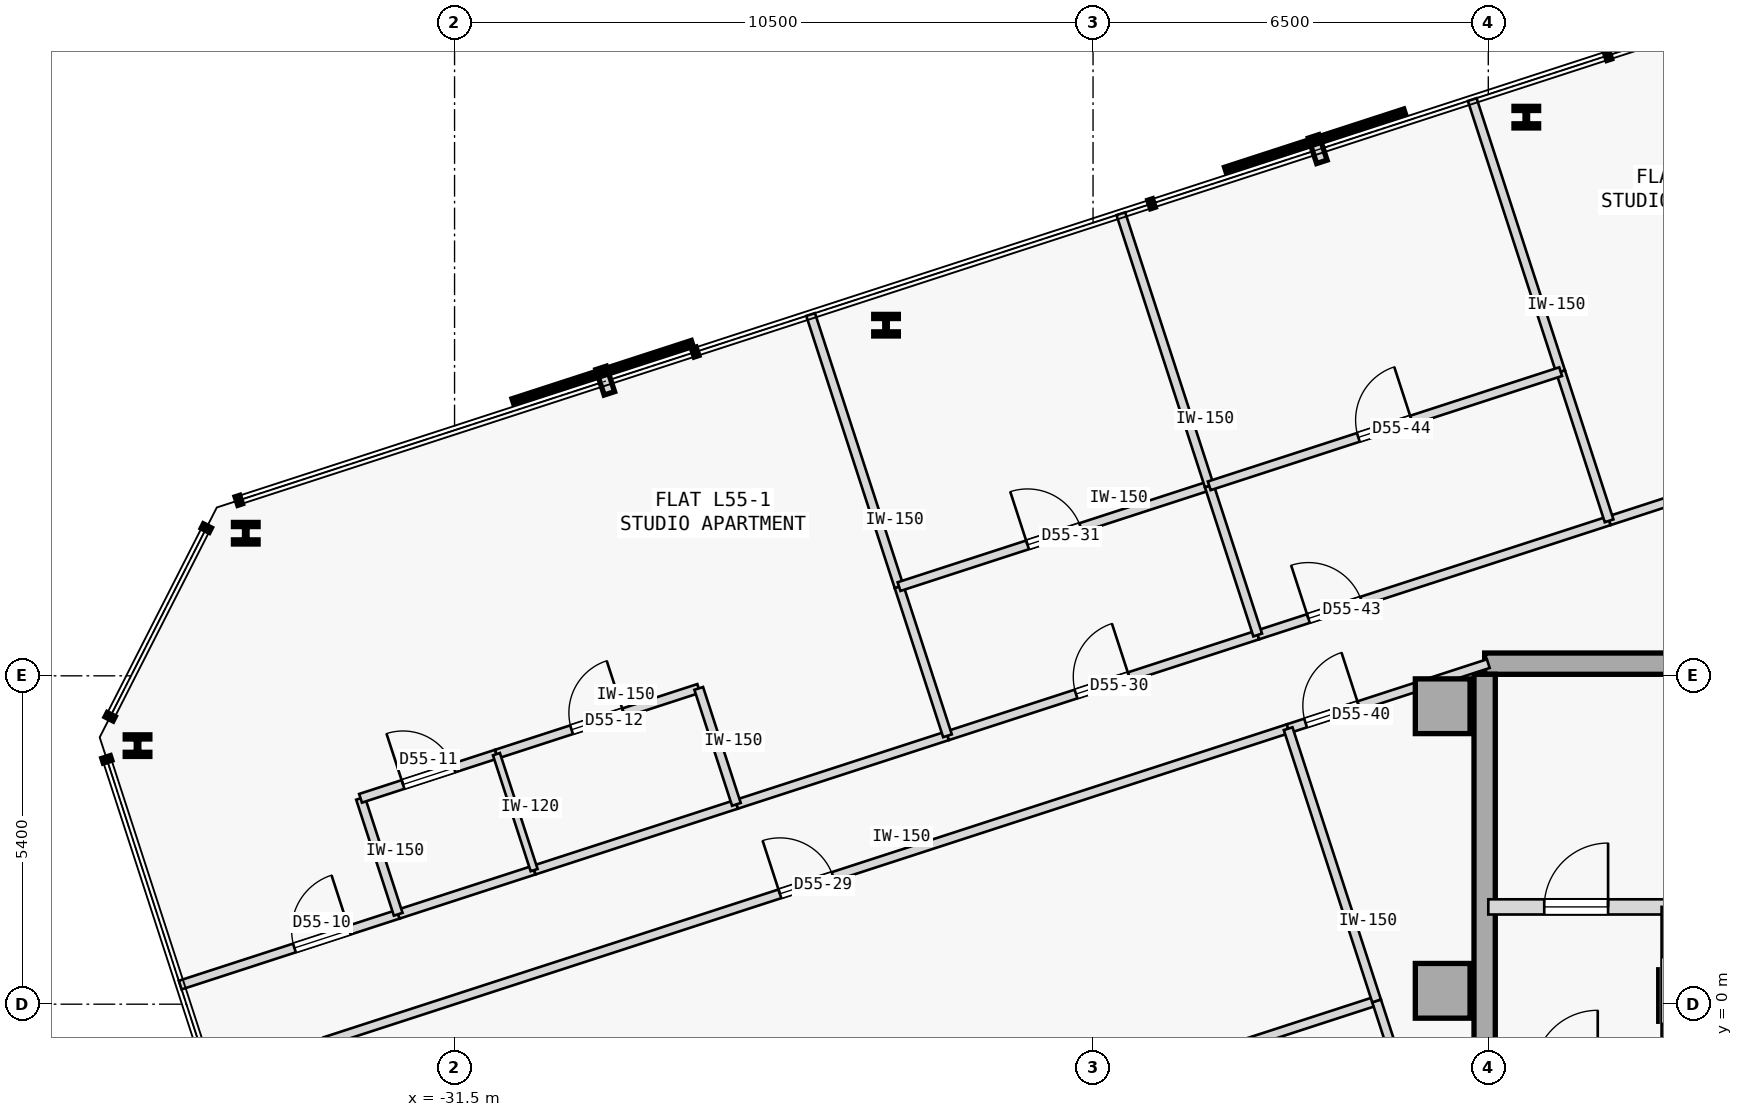
"""IFC4 building model, lengths in metres.
Left out: names, types, materials, properties, quantities, classifications, styles, units other than length and angle.
Written with IfcOpenShell. Run it as: python <this file> out.ifc"""

import sys

from ifc_helpers import new_model, si_unit, direction, frame, frame_2d, origin, origin_2d, place, context, subcontext, project, spatial, rectangle, i_section, extrude, element, fill, save


model = new_model("IFC4")
c1 = context("Model", 3, precision=1e-05, world=origin(), true_north=direction((0.0, 1.0)))
c2 = subcontext(c1, "Body", "Model", "MODEL_VIEW")
j1 = project(units=[si_unit("LENGTHUNIT", "METRE"), si_unit("PLANEANGLEUNIT", "RADIAN")], contexts=[c1])
p1 = place(None, origin())
s1 = spatial("IfcSite", under=j1, at=p1, CompositionType="ELEMENT")
p2 = place(p1, origin())
s2 = spatial("IfcBuilding", under=s1, at=p2, CompositionType="ELEMENT")
p3 = place(p2, frame((0.0, 0.0, 210.9)))
s3 = spatial("IfcBuildingStorey", under=s2, at=p3, CompositionType="ELEMENT", Elevation=210.9)
for number, where, z_axis, x_axis in (
    (1, (-15.25, 4.9, 0.0), (0.0, 0.0, 1.0), (1.0, 0.0, 0.0)),
    (2, (-15.25, 0.22, 0.0), (0.0, 0.0, 1.0), (1.0, 0.0, 0.0)),
):
    element("IfcColumn", number, at=place(p3, frame(where, z_axis=z_axis, x_axis=x_axis)), inside=s3, PredefinedType="COLUMN", context=c2, shape_type="SweptSolid", body=[
        extrude(rectangle(XDim=0.9, YDim=0.9, at=origin_2d()), origin(), (0.0, 0.0, 1.0), 3.35),
    ])
p4 = place(p3, frame((-14.56, 5.6, 0.0), z_axis=(0.0, 0.0, 1.0), x_axis=(1.0, 0.0, 0.0)))
e3 = element("IfcWall", 3, at=p4, inside=s3, PredefinedType="SHEAR", context=c2, shape_type="SweptSolid", body=[
    extrude(rectangle(XDim=11.41, YDim=0.35, at=frame_2d((5.705, 0.0))), origin(), (0.0, 0.0, 1.0), 3.125),
])
p5 = place(p3, frame((-14.56, -5.425, 0.0), z_axis=(0.0, 0.0, 1.0), x_axis=(0.0, 1.0, 0.0)))
e4 = element("IfcWall", 4, at=p5, inside=s3, PredefinedType="SHEAR", context=c2, shape_type="SweptSolid", body=[
    extrude(rectangle(XDim=10.85, YDim=0.35, at=frame_2d((5.425, 0.0))), origin(), (0.0, 0.0, 1.0), 3.125),
])
for number, where, z_axis, x_axis in (
    (5, (-13.875, 14.587, 0.0), (0.0, 0.0, 1.0), (1.0, 0.0, 0.0)),
    (6, (-24.404, 11.166, 0.0), (0.0, 0.0, 1.0), (1.0, 0.0, 0.0)),
    (7, (-34.934, 7.745, 0.0), (0.0, 0.0, 1.0), (1.0, 0.0, 0.0)),
    (8, (-36.713, 4.252, 0.0), (0.0, 0.0, 1.0), (1.0, 0.0, 0.0)),
):
    element("IfcColumn", number, at=place(p3, frame(where, z_axis=z_axis, x_axis=x_axis)), inside=s3, PredefinedType="COLUMN", context=c2, shape_type="SweptSolid", body=[
        extrude(i_section(OverallWidth=0.405, OverallDepth=0.355, WebThickness=0.042, FlangeThickness=0.068, FilletRadius=0.015, at=origin_2d()), origin(), (0.0, 0.0, 1.0), 3.35),
    ])
p6 = place(p3, frame((-14.5, 1.6, 0.0), z_axis=(0.0, 0.0, 1.0), x_axis=(1.0, 0.0, 0.0)))
e9 = element("IfcWall", 9, at=p6, inside=s3, PredefinedType="STANDARD", context=c2, shape_type="SweptSolid", body=[
    extrude(rectangle(XDim=3.6, YDim=0.25, at=frame_2d((1.8, 0.0))), origin(), (0.0, 0.0, 1.0), 3.125),
])
p7 = place(p6, frame((0.92, 0.0, 0.0)))
e10 = element("IfcOpeningElement", 10, at=p7, cuts=e9, PredefinedType="OPENING", context=c2, shape_type="SweptSolid", body=[
    extrude(rectangle(XDim=1.05, YDim=2.15, at=frame_2d((0.525, 1.075))), frame((0.0, 0.135, 0.0), z_axis=(0.0, -1.0, 0.0), x_axis=(1.0, 0.0, 0.0)), (0.0, 0.0, 1.0), 0.27),
])
p8 = place(p3, frame((-11.55, -1.15, 0.0), z_axis=(0.0, 0.0, 1.0), x_axis=(0.0, 1.0, 0.0)))
e11 = element("IfcWall", 11, at=p8, inside=s3, PredefinedType="STANDARD", context=c2, shape_type="SweptSolid", body=[
    extrude(rectangle(XDim=2.75, YDim=0.2, at=frame_2d((1.375, 0.0))), origin(), (0.0, 0.0, 1.0), 3.125),
])
p9 = place(p8, frame((0.825, 0.0, 0.0)))
e12 = element("IfcOpeningElement", 12, at=p9, cuts=e11, PredefinedType="OPENING", context=c2, shape_type="SweptSolid", body=[
    extrude(rectangle(XDim=1.1, YDim=2.15, at=frame_2d((0.55, 1.075))), frame((0.0, 0.11, 0.0), z_axis=(0.0, -1.0, 0.0), x_axis=(1.0, 0.0, 0.0)), (0.0, 0.0, 1.0), 0.22),
])
p10 = place(p3, frame((-36.012, 0.314, 0.0), z_axis=(0.0, 0.0, 1.0), x_axis=(0.951071182868, 0.308971851659, 0.0)))
e13 = element("IfcWall", 13, at=p10, inside=s3, PredefinedType="PARTITIONING", context=c2, shape_type="SweptSolid", body=[
    extrude(rectangle(XDim=3.77, YDim=0.15, at=frame_2d((1.885, 0.0))), origin(), (0.0, 0.0, 1.0), 3.125),
])
p11 = place(p10, frame((1.976, 0.0, 0.0)))
e14 = element("IfcOpeningElement", 14, at=p11, cuts=e13, PredefinedType="OPENING", context=c2, shape_type="SweptSolid", body=[
    extrude(rectangle(XDim=0.95, YDim=2.15, at=frame_2d((0.475, 1.075))), frame((0.0, 0.085, 0.0), z_axis=(0.0, -1.0, 0.0), x_axis=(1.0, 0.0, 0.0)), (0.0, 0.0, 1.0), 0.17),
])
p12 = place(p3, frame((-26.865, 3.286, 0.0), z_axis=(0.0, 0.0, 1.0), x_axis=(0.951057168147, 0.309014988174, 0.0)))
e15 = element("IfcWall", 15, at=p12, inside=s3, PredefinedType="PARTITIONING", context=c2, shape_type="SweptSolid", body=[
    extrude(rectangle(XDim=3.65, YDim=0.15, at=frame_2d((1.825, 0.0))), origin(), (0.0, 0.0, 1.0), 3.125),
])
p13 = place(p3, frame((-32.427, 1.479, 0.0), z_axis=(0.0, 0.0, 1.0), x_axis=(0.951045519245, 0.309050837767, 0.0)))
e16 = element("IfcWall", 16, at=p13, inside=s3, PredefinedType="PARTITIONING", context=c2, shape_type="SweptSolid", body=[
    extrude(rectangle(XDim=2.35, YDim=0.15, at=frame_2d((1.175, 0.0))), origin(), (0.0, 0.0, 1.0), 3.125),
])
p14 = place(p3, frame((-30.192, 2.205, 0.0), z_axis=(0.0, 0.0, 1.0), x_axis=(0.951063814176, 0.308994532905, 0.0)))
e17 = element("IfcWall", 17, at=p14, inside=s3, PredefinedType="PARTITIONING", context=c2, shape_type="SweptSolid", body=[
    extrude(rectangle(XDim=3.498, YDim=0.15, at=frame_2d((1.749, 0.0))), origin(), (0.0, 0.0, 1.0), 3.125),
])
p15 = place(p3, frame((-12.513, 7.949, 0.0), z_axis=(0.0, 0.0, 1.0), x_axis=(0.951050780541, 0.309034646652, 0.0)))
e18 = element("IfcWall", 18, at=p15, inside=s3, PredefinedType="PARTITIONING", context=c2, shape_type="SweptSolid", body=[
    extrude(rectangle(XDim=3.65, YDim=0.15, at=frame_2d((1.825, 0.0))), origin(), (0.0, 0.0, 1.0), 3.125),
])
p16 = place(p3, frame((-33.633, -0.616, 0.0), z_axis=(0.0, 0.0, 1.0), x_axis=(0.951058192995, 0.309011833974, 0.0)))
e19 = element("IfcWall", 19, at=p16, inside=s3, PredefinedType="PARTITIONING", context=c2, shape_type="SweptSolid", body=[
    extrude(rectangle(XDim=16.657, YDim=0.15, at=frame_2d((8.329, 0.0))), origin(), (0.0, 0.0, 1.0), 3.125),
])
p17 = place(p16, frame((7.868, 0.0, 0.0)))
e20 = element("IfcOpeningElement", 20, at=p17, cuts=e19, PredefinedType="OPENING", context=c2, shape_type="SweptSolid", body=[
    extrude(rectangle(XDim=0.92, YDim=2.15, at=frame_2d((0.46, 1.075))), frame((0.0, 0.085, 0.0), z_axis=(0.0, -1.0, 0.0), x_axis=(1.0, 0.0, 0.0)), (0.0, 0.0, 1.0), 0.17),
])
p18 = place(p3, frame((-23.394, 4.414, 0.0), z_axis=(0.0, 0.0, 1.0), x_axis=(0.951050121956, 0.309036673434, 0.0)))
e21 = element("IfcWall", 21, at=p18, inside=s3, PredefinedType="PARTITIONING", context=c2, shape_type="SweptSolid", body=[
    extrude(rectangle(XDim=5.364, YDim=0.15, at=frame_2d((2.682, 0.0))), origin(), (0.0, 0.0, 1.0), 3.125),
])
p19 = place(p18, frame((2.222, 0.0, 0.0)))
e22 = element("IfcOpeningElement", 22, at=p19, cuts=e21, PredefinedType="OPENING", context=c2, shape_type="SweptSolid", body=[
    extrude(rectangle(XDim=0.92, YDim=2.15, at=frame_2d((0.46, 1.075))), frame((0.0, 0.085, 0.0), z_axis=(0.0, -1.0, 0.0), x_axis=(1.0, 0.0, 0.0)), (0.0, 0.0, 1.0), 0.17),
])
p20 = place(p3, frame((-17.792, 4.531, 0.0), z_axis=(0.0, 0.0, 1.0), x_axis=(0.951047546178, 0.309044600193, 0.0)))
e23 = element("IfcWall", 23, at=p20, inside=s3, PredefinedType="PARTITIONING", context=c2, shape_type="SweptSolid", body=[
    extrude(rectangle(XDim=3.461, YDim=0.15, at=frame_2d((1.73, 0.0))), origin(), (0.0, 0.0, 1.0), 3.125),
])
p21 = place(p20, frame((0.302, 0.0, 0.0)))
e24 = element("IfcOpeningElement", 24, at=p21, cuts=e23, PredefinedType="OPENING", context=c2, shape_type="SweptSolid", body=[
    extrude(rectangle(XDim=0.92, YDim=2.15, at=frame_2d((0.46, 1.075))), frame((0.0, 0.085, 0.0), z_axis=(0.0, -1.0, 0.0), x_axis=(1.0, 0.0, 0.0)), (0.0, 0.0, 1.0), 0.17),
])
p22 = place(p3, frame((-18.292, 6.072, 0.0), z_axis=(0.0, 0.0, 1.0), x_axis=(0.951062707515, 0.30899793911, 0.0)))
e25 = element("IfcWall", 25, at=p22, inside=s3, PredefinedType="PARTITIONING", context=c2, shape_type="SweptSolid", body=[
    extrude(rectangle(XDim=6.076, YDim=0.15, at=frame_2d((3.038, 0.0))), origin(), (0.0, 0.0, 1.0), 3.125),
])
p23 = place(p22, frame((0.877, 0.0, 0.0)))
e26 = element("IfcOpeningElement", 26, at=p23, cuts=e25, PredefinedType="OPENING", context=c2, shape_type="SweptSolid", body=[
    extrude(rectangle(XDim=0.92, YDim=2.15, at=frame_2d((0.46, 1.075))), frame((0.0, 0.085, 0.0), z_axis=(0.0, -1.0, 0.0), x_axis=(1.0, 0.0, 0.0)), (0.0, 0.0, 1.0), 0.17),
])
p24 = place(p3, frame((-32.427, 1.479, 0.0), z_axis=(0.0, 0.0, 1.0), x_axis=(-0.309022749039, 0.951054646472, 0.0)))
e27 = element("IfcWall", 27, at=p24, inside=s3, PredefinedType="PARTITIONING", context=c2, shape_type="SweptSolid", body=[
    extrude(rectangle(XDim=2.005, YDim=0.15, at=frame_2d((1.002, 0.0))), origin(), (0.0, 0.0, 1.0), 3.125),
])
p25 = place(p3, frame((-33.046, 3.386, 0.0), z_axis=(0.0, 0.0, 1.0), x_axis=(0.951045519245, 0.309050837767, 0.0)))
e28 = element("IfcWall", 28, at=p25, inside=s3, PredefinedType="PARTITIONING", context=c2, shape_type="SweptSolid", body=[
    extrude(rectangle(XDim=2.35, YDim=0.15, at=frame_2d((1.175, 0.0))), origin(), (0.0, 0.0, 1.0), 3.125),
])
p26 = place(p25, frame((0.735, 0.0, 0.0)))
e29 = element("IfcOpeningElement", 29, at=p26, cuts=e28, PredefinedType="OPENING", context=c2, shape_type="SweptSolid", body=[
    extrude(rectangle(XDim=0.88, YDim=2.15, at=frame_2d((0.44, 1.075))), frame((0.0, 0.085, 0.0), z_axis=(0.0, -1.0, 0.0), x_axis=(1.0, 0.0, 0.0)), (0.0, 0.0, 1.0), 0.17),
])
p27 = place(p3, frame((-30.811, 4.112, 0.0), z_axis=(0.0, 0.0, 1.0), x_axis=(0.951063814176, 0.308994532905, 0.0)))
e30 = element("IfcWall", 30, at=p27, inside=s3, PredefinedType="PARTITIONING", context=c2, shape_type="SweptSolid", body=[
    extrude(rectangle(XDim=3.498, YDim=0.15, at=frame_2d((1.749, 0.0))), origin(), (0.0, 0.0, 1.0), 3.125),
])
p28 = place(p27, frame((1.299, 0.0, 0.0)))
e31 = element("IfcOpeningElement", 31, at=p28, cuts=e30, PredefinedType="OPENING", context=c2, shape_type="SweptSolid", body=[
    extrude(rectangle(XDim=0.9, YDim=2.15, at=frame_2d((0.45, 1.075))), frame((0.0, 0.085, 0.0), z_axis=(0.0, -1.0, 0.0), x_axis=(1.0, 0.0, 0.0)), (0.0, 0.0, 1.0), 0.17),
])
p29 = place(p3, frame((-26.865, 3.286, 0.0), z_axis=(0.0, 0.0, 1.0), x_axis=(-0.309022749039, 0.951054646472, 0.0)))
e32 = element("IfcWall", 32, at=p29, inside=s3, PredefinedType="PARTITIONING", context=c2, shape_type="SweptSolid", body=[
    extrude(rectangle(XDim=2.005, YDim=0.15, at=frame_2d((1.002, 0.0))), origin(), (0.0, 0.0, 1.0), 3.125),
])
p30 = place(p3, frame((-23.394, 4.414, 0.0), z_axis=(0.0, 0.0, 1.0), x_axis=(-0.308976906612, 0.951069540665, 0.0)))
e33 = element("IfcWall", 33, at=p30, inside=s3, PredefinedType="PARTITIONING", context=c2, shape_type="SweptSolid", body=[
    extrude(rectangle(XDim=2.579, YDim=0.15, at=frame_2d((1.29, 0.0))), origin(), (0.0, 0.0, 1.0), 3.125),
])
p31 = place(p3, frame((-24.19, 6.867, 0.0), z_axis=(0.0, 0.0, 1.0), x_axis=(-0.309057912466, 0.951043220228, 0.0)))
e34 = element("IfcWall", 34, at=p31, inside=s3, PredefinedType="PARTITIONING", context=c2, shape_type="SweptSolid", body=[
    extrude(rectangle(XDim=4.705, YDim=0.15, at=frame_2d((2.353, 0.0))), origin(), (0.0, 0.0, 1.0), 3.125),
])
p32 = place(p3, frame((-30.192, 2.205, 0.0), z_axis=(0.0, 0.0, 1.0), x_axis=(-0.309022749039, 0.951054646472, 0.0)))
e35 = element("IfcWall", 35, at=p32, inside=s3, PredefinedType="PARTITIONING", context=c2, shape_type="SweptSolid", body=[
    extrude(rectangle(XDim=2.005, YDim=0.12, at=frame_2d((1.002, 0.0))), origin(), (0.0, 0.0, 1.0), 3.125),
])
p33 = place(p3, frame((-12.513, 7.949, 0.0), z_axis=(0.0, 0.0, 1.0), x_axis=(-0.309062527822, 0.951041720376, 0.0)))
e36 = element("IfcWall", 36, at=p33, inside=s3, PredefinedType="PARTITIONING", context=c2, shape_type="SweptSolid", body=[
    extrude(rectangle(XDim=2.579, YDim=0.15, at=frame_2d((1.29, 0.0))), origin(), (0.0, 0.0, 1.0), 3.125),
])
p34 = place(p3, frame((-13.311, 10.402, 0.0), z_axis=(0.0, 0.0, 1.0), x_axis=(-0.309010977541, 0.951058471262, 0.0)))
e37 = element("IfcWall", 37, at=p34, inside=s3, PredefinedType="PARTITIONING", context=c2, shape_type="SweptSolid", body=[
    extrude(rectangle(XDim=4.705, YDim=0.15, at=frame_2d((2.353, 0.0))), origin(), (0.0, 0.0, 1.0), 3.125),
])
p35 = place(p3, frame((-32.179, -5.093, 0.0), z_axis=(0.0, 0.0, 1.0), x_axis=(0.951053885426, 0.309025091239, 0.0)))
e38 = element("IfcWall", 38, at=p35, inside=s3, PredefinedType="PARTITIONING", context=c2, shape_type="SweptSolid", body=[
    extrude(rectangle(XDim=16.657, YDim=0.15, at=frame_2d((8.329, 0.0))), origin(), (0.0, 0.0, 1.0), 3.125),
])
p36 = place(p3, frame((-15.685, -1.952, 0.0), z_axis=(0.0, 0.0, 1.0), x_axis=(-0.308929092959, 0.951085072706, 0.0)))
e39 = element("IfcWall", 39, at=p36, inside=s3, PredefinedType="PARTITIONING", context=c2, shape_type="SweptSolid", body=[
    extrude(rectangle(XDim=2.11, YDim=0.15, at=frame_2d((1.055, 0.0))), origin(), (0.0, 0.0, 1.0), 3.125),
])
p37 = place(p3, frame((-16.337, 0.054, 0.0), z_axis=(0.0, 0.0, 1.0), x_axis=(-0.309029776355, 0.951052363083, 0.0)))
e40 = element("IfcWall", 40, at=p37, inside=s3, PredefinedType="PARTITIONING", context=c2, shape_type="SweptSolid", body=[
    extrude(rectangle(XDim=4.707, YDim=0.15, at=frame_2d((2.354, 0.0))), origin(), (0.0, 0.0, 1.0), 3.125),
])
p38 = place(p3, frame((-24.19, 6.867, 0.0), z_axis=(0.0, 0.0, 1.0), x_axis=(0.951059152206, 0.309008881758, 0.0)))
e41 = element("IfcWall", 41, at=p38, inside=s3, PredefinedType="PARTITIONING", context=c2, shape_type="SweptSolid", body=[
    extrude(rectangle(XDim=5.364, YDim=0.15, at=frame_2d((2.682, 0.0))), origin(), (0.0, 0.0, 1.0), 3.125),
])
p39 = place(p38, frame((2.222, 0.0, 0.0)))
e42 = element("IfcOpeningElement", 42, at=p39, cuts=e41, PredefinedType="OPENING", context=c2, shape_type="SweptSolid", body=[
    extrude(rectangle(XDim=0.92, YDim=2.15, at=frame_2d((0.46, 1.075))), frame((0.0, 0.085, 0.0), z_axis=(0.0, -1.0, 0.0), x_axis=(1.0, 0.0, 0.0)), (0.0, 0.0, 1.0), 0.17),
])
p40 = place(p3, frame((-18.292, 6.072, 0.0), z_axis=(0.0, 0.0, 1.0), x_axis=(-0.309090353524, 0.951032677335, 0.0)))
e43 = element("IfcWall", 43, at=p40, inside=s3, PredefinedType="PARTITIONING", context=c2, shape_type="SweptSolid", body=[
    extrude(rectangle(XDim=2.579, YDim=0.15, at=frame_2d((1.29, 0.0))), origin(), (0.0, 0.0, 1.0), 3.125),
])
p41 = place(p3, frame((-19.089, 8.524, 0.0), z_axis=(0.0, 0.0, 1.0), x_axis=(-0.308995728133, 0.951063425853, 0.0)))
e44 = element("IfcWall", 44, at=p41, inside=s3, PredefinedType="PARTITIONING", context=c2, shape_type="SweptSolid", body=[
    extrude(rectangle(XDim=4.705, YDim=0.15, at=frame_2d((2.353, 0.0))), origin(), (0.0, 0.0, 1.0), 3.125),
])
p42 = place(p3, frame((-19.089, 8.524, 0.0), z_axis=(0.0, 0.0, 1.0), x_axis=(0.951050898488, 0.309034283674, 0.0)))
e45 = element("IfcWall", 45, at=p42, inside=s3, PredefinedType="PARTITIONING", context=c2, shape_type="SweptSolid", body=[
    extrude(rectangle(XDim=6.076, YDim=0.15, at=frame_2d((3.038, 0.0))), origin(), (0.0, 0.0, 1.0), 3.125),
])
p43 = place(p42, frame((2.578, 0.0, 0.0)))
e46 = element("IfcOpeningElement", 46, at=p43, cuts=e45, PredefinedType="OPENING", context=c2, shape_type="SweptSolid", body=[
    extrude(rectangle(XDim=0.92, YDim=2.15, at=frame_2d((0.46, 1.075))), frame((0.0, 0.085, 0.0), z_axis=(0.0, -1.0, 0.0), x_axis=(1.0, 0.0, 0.0)), (0.0, 0.0, 1.0), 0.17),
])
p44 = place(p7, origin())
e47 = element("IfcDoor", 47, at=p44, inside=s3, OperationType="SINGLE_SWING_RIGHT", PredefinedType="DOOR", context=c2, shape_type="SweptSolid", body=[
    extrude(rectangle(XDim=1.05, YDim=2.15, at=frame_2d((0.525, 1.075))), frame((0.0, 0.025, 0.0), z_axis=(0.0, -1.0, 0.0), x_axis=(1.0, 0.0, 0.0)), (0.0, 0.0, 1.0), 0.05),
])
fill(e10, e47)
p45 = place(p11, origin())
e48 = element("IfcDoor", 48, at=p45, inside=s3, OperationType="SINGLE_SWING_RIGHT", PredefinedType="DOOR", context=c2, shape_type="SweptSolid", body=[
    extrude(rectangle(XDim=0.95, YDim=2.15, at=frame_2d((0.475, 1.075))), frame((0.0, 0.025, 0.0), z_axis=(0.0, -1.0, 0.0), x_axis=(1.0, 0.0, 0.0)), (0.0, 0.0, 1.0), 0.05),
])
fill(e14, e48)
p46 = place(p26, origin())
e49 = element("IfcDoor", 49, at=p46, inside=s3, OperationType="SINGLE_SWING_LEFT", PredefinedType="DOOR", context=c2, shape_type="SweptSolid", body=[
    extrude(rectangle(XDim=0.88, YDim=2.15, at=frame_2d((0.44, 1.075))), frame((0.0, 0.025, 0.0), z_axis=(0.0, -1.0, 0.0), x_axis=(1.0, 0.0, 0.0)), (0.0, 0.0, 1.0), 0.05),
])
fill(e29, e49)
p47 = place(p28, origin())
e50 = element("IfcDoor", 50, at=p47, inside=s3, OperationType="SINGLE_SWING_RIGHT", PredefinedType="DOOR", context=c2, shape_type="SweptSolid", body=[
    extrude(rectangle(XDim=0.9, YDim=2.15, at=frame_2d((0.45, 1.075))), frame((0.0, 0.025, 0.0), z_axis=(0.0, -1.0, 0.0), x_axis=(1.0, 0.0, 0.0)), (0.0, 0.0, 1.0), 0.05),
])
fill(e31, e50)
p48 = place(p17, origin())
e51 = element("IfcDoor", 51, at=p48, inside=s3, OperationType="SINGLE_SWING_LEFT", PredefinedType="DOOR", context=c2, shape_type="SweptSolid", body=[
    extrude(rectangle(XDim=0.92, YDim=2.15, at=frame_2d((0.46, 1.075))), frame((0.0, 0.025, 0.0), z_axis=(0.0, -1.0, 0.0), x_axis=(1.0, 0.0, 0.0)), (0.0, 0.0, 1.0), 0.05),
])
fill(e20, e51)
p49 = place(p19, origin())
e52 = element("IfcDoor", 52, at=p49, inside=s3, OperationType="SINGLE_SWING_RIGHT", PredefinedType="DOOR", context=c2, shape_type="SweptSolid", body=[
    extrude(rectangle(XDim=0.92, YDim=2.15, at=frame_2d((0.46, 1.075))), frame((0.0, 0.025, 0.0), z_axis=(0.0, -1.0, 0.0), x_axis=(1.0, 0.0, 0.0)), (0.0, 0.0, 1.0), 0.05),
])
fill(e22, e52)
p50 = place(p39, origin())
e53 = element("IfcDoor", 53, at=p50, inside=s3, OperationType="SINGLE_SWING_LEFT", PredefinedType="DOOR", context=c2, shape_type="SweptSolid", body=[
    extrude(rectangle(XDim=0.92, YDim=2.15, at=frame_2d((0.46, 1.075))), frame((0.0, 0.025, 0.0), z_axis=(0.0, -1.0, 0.0), x_axis=(1.0, 0.0, 0.0)), (0.0, 0.0, 1.0), 0.05),
])
fill(e42, e53)
p51 = place(p21, origin())
e54 = element("IfcDoor", 54, at=p51, inside=s3, OperationType="SINGLE_SWING_RIGHT", PredefinedType="DOOR", context=c2, shape_type="SweptSolid", body=[
    extrude(rectangle(XDim=0.92, YDim=2.15, at=frame_2d((0.46, 1.075))), frame((0.0, 0.025, 0.0), z_axis=(0.0, -1.0, 0.0), x_axis=(1.0, 0.0, 0.0)), (0.0, 0.0, 1.0), 0.05),
])
fill(e24, e54)
p52 = place(p23, origin())
e55 = element("IfcDoor", 55, at=p52, inside=s3, OperationType="SINGLE_SWING_LEFT", PredefinedType="DOOR", context=c2, shape_type="SweptSolid", body=[
    extrude(rectangle(XDim=0.92, YDim=2.15, at=frame_2d((0.46, 1.075))), frame((0.0, 0.025, 0.0), z_axis=(0.0, -1.0, 0.0), x_axis=(1.0, 0.0, 0.0)), (0.0, 0.0, 1.0), 0.05),
])
fill(e26, e55)
p53 = place(p43, origin())
e56 = element("IfcDoor", 56, at=p53, inside=s3, OperationType="SINGLE_SWING_RIGHT", PredefinedType="DOOR", context=c2, shape_type="SweptSolid", body=[
    extrude(rectangle(XDim=0.92, YDim=2.15, at=frame_2d((0.46, 1.075))), frame((0.0, 0.025, 0.0), z_axis=(0.0, -1.0, 0.0), x_axis=(1.0, 0.0, 0.0)), (0.0, 0.0, 1.0), 0.05),
])
fill(e46, e56)
save(model, sys.argv[1])
